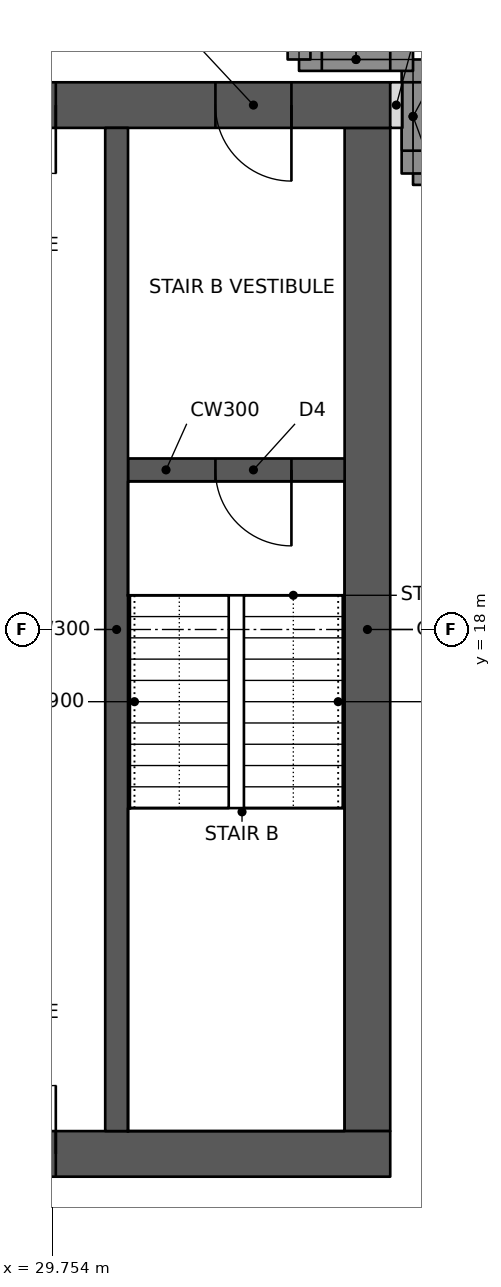
"""IFC4 building model, lengths in metres.
Left out: names, types, materials, properties, quantities, classifications, styles, units other than length and angle.
Written with IfcOpenShell. Run it as: python <this file> out.ifc"""

import sys

from ifc_helpers import new_model, si_unit, direction, frame, frame_2d, origin, place, context, subcontext, project, spatial, rectangle, extrude, element, fill, save


model = new_model("IFC4")
c1 = context("Model", 3, precision=1e-05, world=origin(), true_north=direction((0.0, 1.0)))
c2 = subcontext(c1, "Body", "Model", "MODEL_VIEW")
j1 = project(units=[si_unit("LENGTHUNIT", "METRE"), si_unit("PLANEANGLEUNIT", "RADIAN")], contexts=[c1])
p1 = place(None, origin())
s1 = spatial("IfcSite", under=j1, at=p1, CompositionType="ELEMENT")
p2 = place(p1, origin())
s2 = spatial("IfcBuilding", under=s1, at=p2, CompositionType="ELEMENT")
p3 = place(p2, frame((0.0, 0.0, 248.2)))
s3 = spatial("IfcBuildingStorey", under=s2, at=p3, CompositionType="ELEMENT", Elevation=248.2)
p4 = place(p3, frame((10.8, 11.1, 0.0), z_axis=(0.0, 0.0, 1.0), x_axis=(1.0, 0.0, 0.0)))
e1 = element("IfcWall", 1, at=p4, inside=s3, PredefinedType="SHEAR", context=c2, shape_type="SweptSolid", body=[
    extrude(rectangle(XDim=23.4, YDim=0.6, at=frame_2d((11.7, 0.0))), origin(), (0.0, 0.0, 1.0), 3.6),
])
p5 = place(p4, frame((1.0, 0.0, 0.0)))
e2 = element("IfcOpeningElement", 2, at=p5, cuts=e1, PredefinedType="OPENING", context=c2, shape_type="SweptSolid", body=[
    extrude(rectangle(XDim=1.0, YDim=2.1, at=frame_2d((0.5, 1.05))), frame((0.0, 0.31, 0.0), z_axis=(0.0, -1.0, 0.0), x_axis=(1.0, 0.0, 0.0)), (0.0, 0.0, 1.0), 0.62),
])
p6 = place(p4, frame((17.2, 0.0, 0.0)))
e3 = element("IfcOpeningElement", 3, at=p6, cuts=e1, PredefinedType="OPENING", context=c2, shape_type="SweptSolid", body=[
    extrude(rectangle(XDim=1.8, YDim=2.1, at=frame_2d((0.9, 1.05))), frame((0.0, 0.31, 0.0), z_axis=(0.0, -1.0, 0.0), x_axis=(1.0, 0.0, 0.0)), (0.0, 0.0, 1.0), 0.62),
])
p7 = place(p3, frame((10.8, 24.9, 0.0), z_axis=(0.0, 0.0, 1.0), x_axis=(1.0, 0.0, 0.0)))
e4 = element("IfcWall", 4, at=p7, inside=s3, PredefinedType="SHEAR", context=c2, shape_type="SweptSolid", body=[
    extrude(rectangle(XDim=23.4, YDim=0.6, at=frame_2d((11.7, 0.0))), origin(), (0.0, 0.0, 1.0), 3.6),
])
p8 = place(p7, frame((17.2, 0.0, 0.0)))
e5 = element("IfcOpeningElement", 5, at=p8, cuts=e4, PredefinedType="OPENING", context=c2, shape_type="SweptSolid", body=[
    extrude(rectangle(XDim=1.8, YDim=2.1, at=frame_2d((0.9, 1.05))), frame((0.0, 0.31, 0.0), z_axis=(0.0, -1.0, 0.0), x_axis=(1.0, 0.0, 0.0)), (0.0, 0.0, 1.0), 0.62),
])
p9 = place(p7, frame((21.1, 0.0, 0.0)))
e6 = element("IfcOpeningElement", 6, at=p9, cuts=e4, PredefinedType="OPENING", context=c2, shape_type="SweptSolid", body=[
    extrude(rectangle(XDim=1.0, YDim=2.1, at=frame_2d((0.5, 1.05))), frame((0.0, 0.31, 0.0), z_axis=(0.0, -1.0, 0.0), x_axis=(1.0, 0.0, 0.0)), (0.0, 0.0, 1.0), 0.62),
])
p10 = place(p7, frame((4.9, 0.0, 0.0)))
e7 = element("IfcOpeningElement", 7, at=p10, cuts=e4, PredefinedType="OPENING", context=c2, shape_type="SweptSolid", body=[
    extrude(rectangle(XDim=1.0, YDim=2.1, at=frame_2d((0.5, 1.05))), frame((0.0, 0.31, 0.0), z_axis=(0.0, -1.0, 0.0), x_axis=(1.0, 0.0, 0.0)), (0.0, 0.0, 1.0), 0.62),
])
p11 = place(p3, frame((33.9, 11.4, 0.0), z_axis=(0.0, 0.0, 1.0), x_axis=(0.0, 1.0, 0.0)))
e8 = element("IfcWall", 8, at=p11, inside=s3, PredefinedType="SHEAR", context=c2, shape_type="SweptSolid", body=[
    extrude(rectangle(XDim=13.2, YDim=0.6, at=frame_2d((6.6, 0.0))), origin(), (0.0, 0.0, 1.0), 3.6),
])
p12 = place(p3, frame((30.6, 11.4, 0.0), z_axis=(0.0, 0.0, 1.0), x_axis=(0.0, 1.0, 0.0)))
e9 = element("IfcWall", 9, at=p12, inside=s3, PredefinedType="SHEAR", context=c2, shape_type="SweptSolid", body=[
    extrude(rectangle(XDim=13.2, YDim=0.3, at=frame_2d((6.6, 0.0))), origin(), (0.0, 0.0, 1.0), 3.6),
])
p13 = place(p3, frame((30.75, 20.1, 0.0), z_axis=(0.0, 0.0, 1.0), x_axis=(1.0, 0.0, 0.0)))
e10 = element("IfcWall", 10, at=p13, inside=s3, PredefinedType="SHEAR", context=c2, shape_type="SweptSolid", body=[
    extrude(rectangle(XDim=2.85, YDim=0.3, at=frame_2d((1.425, 0.0))), origin(), (0.0, 0.0, 1.0), 3.6),
])
p14 = place(p13, frame((1.15, 0.0, 0.0)))
e11 = element("IfcOpeningElement", 11, at=p14, cuts=e10, PredefinedType="OPENING", context=c2, shape_type="SweptSolid", body=[
    extrude(rectangle(XDim=1.0, YDim=2.1, at=frame_2d((0.5, 1.05))), frame((0.0, 0.16, 0.0), z_axis=(0.0, -1.0, 0.0), x_axis=(1.0, 0.0, 0.0)), (0.0, 0.0, 1.0), 0.32),
])
p15 = place(p3, frame((36.0, 24.0, 0.0), z_axis=(0.0, 0.0, 1.0), x_axis=(-1.0, 0.0, 0.0)))
e12 = element("IfcWall", 12, at=p15, inside=s3, PredefinedType="SOLIDWALL", context=c2, shape_type="SweptSolid", body=[
    extrude(rectangle(XDim=1.5, YDim=0.3, at=frame_2d((0.75, 0.0))), origin(), (0.0, 0.0, 1.0), 2.62),
])
p16 = place(p3, frame((34.5, 24.0, 0.0), z_axis=(0.0, 0.0, 1.0), x_axis=(0.0, 1.0, 0.0)))
e13 = element("IfcWall", 13, at=p16, inside=s3, PredefinedType="SOLIDWALL", context=c2, shape_type="SweptSolid", body=[
    extrude(rectangle(XDim=1.5, YDim=0.3, at=frame_2d((0.75, 0.0))), origin(), (0.0, 0.0, 1.0), 3.4),
])
p17 = place(p16, frame((0.3, 0.0, 0.6)))
e14 = element("IfcOpeningElement", 14, at=p17, cuts=e13, PredefinedType="OPENING", context=c2, shape_type="SweptSolid", body=[
    extrude(rectangle(XDim=0.9, YDim=2.2, at=frame_2d((0.45, 1.1))), frame((0.0, 0.16, 0.0), z_axis=(0.0, -1.0, 0.0), x_axis=(1.0, 0.0, 0.0)), (0.0, 0.0, 1.0), 0.32),
])
p18 = place(p3, frame((34.5, 25.5, 0.0), z_axis=(0.0, 0.0, 1.0), x_axis=(-1.0, 0.0, 0.0)))
e15 = element("IfcWall", 15, at=p18, inside=s3, PredefinedType="SOLIDWALL", context=c2, shape_type="SweptSolid", body=[
    extrude(rectangle(XDim=1.5, YDim=0.3, at=frame_2d((0.75, 0.0))), origin(), (0.0, 0.0, 1.0), 3.4),
])
p19 = place(p18, frame((0.3, 0.0, 0.6)))
e16 = element("IfcOpeningElement", 16, at=p19, cuts=e15, PredefinedType="OPENING", context=c2, shape_type="SweptSolid", body=[
    extrude(rectangle(XDim=0.9, YDim=2.2, at=frame_2d((0.45, 1.1))), frame((0.0, 0.16, 0.0), z_axis=(0.0, -1.0, 0.0), x_axis=(1.0, 0.0, 0.0)), (0.0, 0.0, 1.0), 0.32),
])
p20 = place(p3, frame((33.0, 25.5, 0.0), z_axis=(0.0, 0.0, 1.0), x_axis=(0.0, 1.0, 0.0)))
e17 = element("IfcWall", 17, at=p20, inside=s3, PredefinedType="SOLIDWALL", context=c2, shape_type="SweptSolid", body=[
    extrude(rectangle(XDim=1.5, YDim=0.3, at=frame_2d((0.75, 0.0))), origin(), (0.0, 0.0, 1.0), 2.62),
])
p21 = place(p3, frame((34.2, 24.9, 0.0), z_axis=(0.0, 0.0, 1.0), x_axis=(1.0, 0.0, 0.0)))
e18 = element("IfcWall", 18, at=p21, inside=s3, PredefinedType="PARTITIONING", context=c2, shape_type="SweptSolid", body=[
    extrude(rectangle(XDim=0.16, YDim=0.6, at=frame_2d((0.08, 0.0))), origin(), (0.0, 0.0, 1.0), 3.4),
])
p22 = place(p17, origin())
e19 = element("IfcWindow", 19, at=p22, inside=s3, PartitioningType="SINGLE_PANEL", PredefinedType="WINDOW", context=c2, shape_type="SweptSolid", body=[
    extrude(rectangle(XDim=0.9, YDim=2.2, at=frame_2d((0.45, 1.1))), frame((0.0, 0.03, 0.0), z_axis=(0.0, -1.0, 0.0), x_axis=(1.0, 0.0, 0.0)), (0.0, 0.0, 1.0), 0.06),
])
fill(e14, e19)
p23 = place(p19, origin())
e20 = element("IfcWindow", 20, at=p23, inside=s3, PartitioningType="SINGLE_PANEL", PredefinedType="WINDOW", context=c2, shape_type="SweptSolid", body=[
    extrude(rectangle(XDim=0.9, YDim=2.2, at=frame_2d((0.45, 1.1))), frame((0.0, 0.03, 0.0), z_axis=(0.0, -1.0, 0.0), x_axis=(1.0, 0.0, 0.0)), (0.0, 0.0, 1.0), 0.06),
])
fill(e16, e20)
p24 = place(p6, origin())
e21 = element("IfcDoor", 21, at=p24, inside=s3, OperationType="DOUBLE_DOOR_SINGLE_SWING", PredefinedType="DOOR", context=c2, shape_type="SweptSolid", body=[
    extrude(rectangle(XDim=1.8, YDim=2.1, at=frame_2d((0.9, 1.05))), frame((0.0, 0.025, 0.0), z_axis=(0.0, -1.0, 0.0), x_axis=(1.0, 0.0, 0.0)), (0.0, 0.0, 1.0), 0.05),
])
fill(e3, e21)
p25 = place(p8, frame((1.8, 0.0, 0.0), z_axis=(0.0, 0.0, 1.0), x_axis=(-1.0, 0.0, 0.0)))
e22 = element("IfcDoor", 22, at=p25, inside=s3, OperationType="DOUBLE_DOOR_SINGLE_SWING", PredefinedType="DOOR", context=c2, shape_type="SweptSolid", body=[
    extrude(rectangle(XDim=1.8, YDim=2.1, at=frame_2d((0.9, 1.05))), frame((0.0, 0.025, 0.0), z_axis=(0.0, -1.0, 0.0), x_axis=(1.0, 0.0, 0.0)), (0.0, 0.0, 1.0), 0.05),
])
fill(e5, e22)
p26 = place(p9, frame((1.0, 0.0, 0.0), z_axis=(0.0, 0.0, 1.0), x_axis=(-1.0, 0.0, 0.0)))
e23 = element("IfcDoor", 23, at=p26, inside=s3, OperationType="SINGLE_SWING_LEFT", PredefinedType="DOOR", context=c2, shape_type="SweptSolid", body=[
    extrude(rectangle(XDim=1.0, YDim=2.1, at=frame_2d((0.5, 1.05))), frame((0.0, 0.025, 0.0), z_axis=(0.0, -1.0, 0.0), x_axis=(1.0, 0.0, 0.0)), (0.0, 0.0, 1.0), 0.05),
])
fill(e6, e23)
p27 = place(p14, frame((1.0, 0.0, 0.0), z_axis=(0.0, 0.0, 1.0), x_axis=(-1.0, 0.0, 0.0)))
e24 = element("IfcDoor", 24, at=p27, inside=s3, OperationType="SINGLE_SWING_LEFT", PredefinedType="DOOR", context=c2, shape_type="SweptSolid", body=[
    extrude(rectangle(XDim=1.0, YDim=2.1, at=frame_2d((0.5, 1.05))), frame((0.0, 0.025, 0.0), z_axis=(0.0, -1.0, 0.0), x_axis=(1.0, 0.0, 0.0)), (0.0, 0.0, 1.0), 0.05),
])
fill(e11, e24)
save(model, sys.argv[1])
